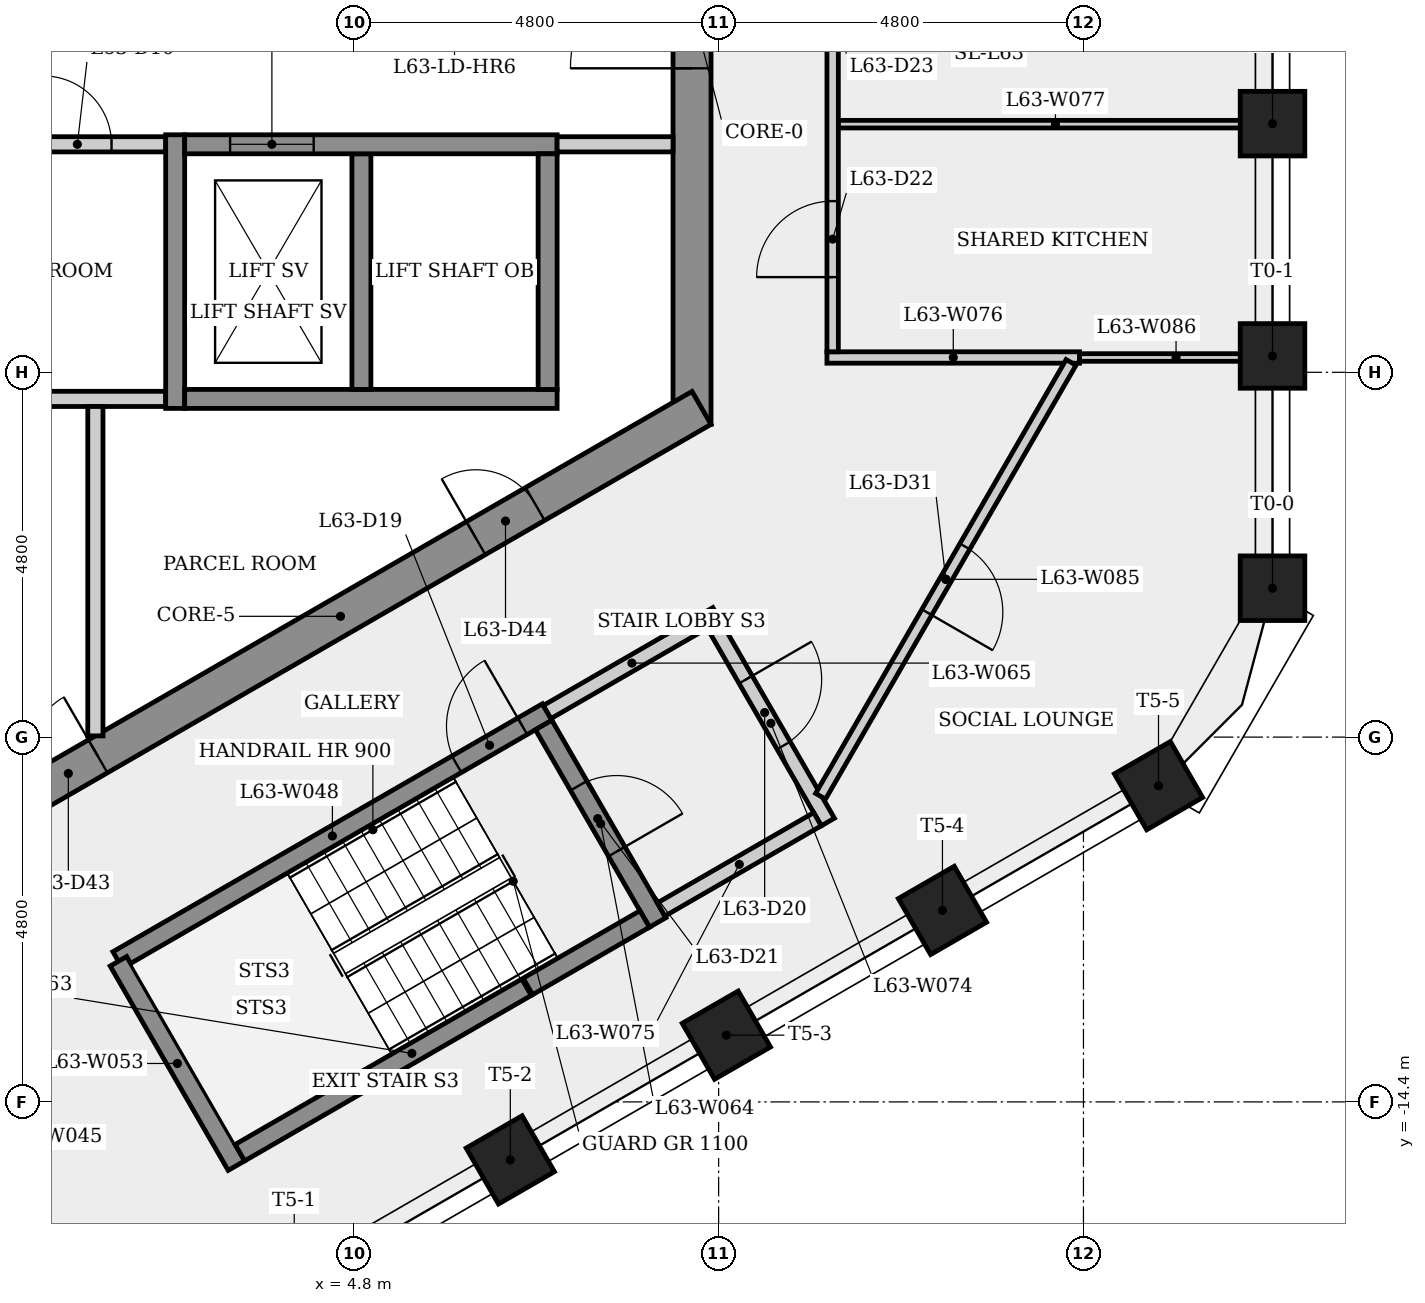
"""IFC4 building model, lengths in metres.
Left out: names, types, materials, properties, quantities, classifications, styles, units other than length and angle.
Written with IfcOpenShell. Run it as: python <this file> out.ifc"""

import sys

from ifc_helpers import new_model, si_unit, direction, frame, frame_2d, origin, origin_2d, place, context, subcontext, project, spatial, rectangle, extrude, element, fill, save


model = new_model("IFC4")
c1 = context("Model", 3, precision=1e-05, world=origin(), true_north=direction((0.0, 1.0)))
c2 = subcontext(c1, "Body", "Model", "MODEL_VIEW")
j1 = project(units=[si_unit("LENGTHUNIT", "METRE"), si_unit("PLANEANGLEUNIT", "RADIAN")], contexts=[c1])
p1 = place(None, origin())
s1 = spatial("IfcSite", under=j1, at=p1, CompositionType="ELEMENT")
p2 = place(p1, origin())
s2 = spatial("IfcBuilding", under=s1, at=p2, CompositionType="ELEMENT")
p3 = place(p2, frame((0.0, 0.0, 235.9)))
s3 = spatial("IfcBuildingStorey", under=s2, at=p3, CompositionType="ELEMENT", Elevation=235.9)
p4 = place(p3, frame((9.25, -5.485, 0.0), z_axis=(0.0, 0.0, 1.0), x_axis=(0.0, 1.0, 0.0)))
e1 = element("IfcWall", 1, at=p4, inside=s3, PredefinedType="SHEAR", context=c2, shape_type="SweptSolid", body=[
    extrude(rectangle(XDim=10.97, YDim=0.5, at=frame_2d((5.485, 0.0))), origin(), (0.0, 0.0, 1.0), 3.4),
])
p5 = place(p4, frame((4.685, 0.0, 0.0)))
e2 = element("IfcOpeningElement", 2, at=p5, cuts=e1, PredefinedType="OPENING", context=c2, shape_type="SweptSolid", body=[
    extrude(rectangle(XDim=1.6, YDim=2.1, at=frame_2d((0.8, 1.05))), frame((0.0, 0.26, 0.0), z_axis=(0.0, -1.0, 0.0), x_axis=(1.0, 0.0, 0.0)), (0.0, 0.0, 1.0), 0.52),
])
p6 = place(p3, frame((-0.125, -10.753, 0.0), z_axis=(0.0, 0.0, 1.0), x_axis=(0.866023993627, 0.500002442456, 0.0)))
e3 = element("IfcWall", 3, at=p6, inside=s3, PredefinedType="SHEAR", context=c2, shape_type="SweptSolid", body=[
    extrude(rectangle(XDim=10.97, YDim=0.5, at=frame_2d((5.485, 0.0))), origin(), (0.0, 0.0, 1.0), 3.4),
])
p7 = place(p6, frame((0.9, 0.0, 0.0)))
e4 = element("IfcOpeningElement", 4, at=p7, cuts=e3, PredefinedType="OPENING", context=c2, shape_type="SweptSolid", body=[
    extrude(rectangle(XDim=0.9, YDim=2.1, at=frame_2d((0.45, 1.05))), frame((0.0, 0.26, 0.0), z_axis=(0.0, -1.0, 0.0), x_axis=(1.0, 0.0, 0.0)), (0.0, 0.0, 1.0), 0.52),
])
p8 = place(p6, frame((7.542, 0.0, 0.0)))
e5 = element("IfcOpeningElement", 5, at=p8, cuts=e3, PredefinedType="OPENING", context=c2, shape_type="SweptSolid", body=[
    extrude(rectangle(XDim=0.9, YDim=2.1, at=frame_2d((0.45, 1.05))), frame((0.0, 0.26, 0.0), z_axis=(0.0, -1.0, 0.0), x_axis=(1.0, 0.0, 0.0)), (0.0, 0.0, 1.0), 0.52),
])
for number, where, z_axis, x_axis in (
    (6, (16.887, -7.641, 0.0), (0.0, 0.0, 1.0), (1.0, 0.0, 0.0)),
    (7, (16.887, -4.585, 0.0), (0.0, 0.0, 1.0), (1.0, 0.0, 0.0)),
    (8, (16.887, -1.528, 0.0), (0.0, 0.0, 1.0), (1.0, 0.0, 0.0)),
    (9, (6.859, -15.163, 0.0), (0.0, 0.0, 1.0), (0.5, -0.866, 0.0)),
    (10, (9.702, -13.522, 0.0), (0.0, 0.0, 1.0), (0.5, -0.866, 0.0)),
    (11, (12.545, -11.88, 0.0), (0.0, 0.0, 1.0), (0.5, -0.866, 0.0)),
    (12, (15.387, -10.239, 0.0), (0.0, 0.0, 1.0), (0.5, -0.866, 0.0)),
):
    element("IfcColumn", number, at=place(p3, frame(where, z_axis=z_axis, x_axis=x_axis)), inside=s3, PredefinedType="COLUMN", context=c2, shape_type="SweptSolid", body=[
        extrude(rectangle(XDim=0.85, YDim=0.85, at=origin_2d()), origin(), (0.0, 0.0, 1.0), 3.4),
    ])
p9 = place(p3, frame((-9.0, -5.15, 0.0), z_axis=(0.0, 0.0, 1.0), x_axis=(1.0, 0.0, 0.0)))
e13 = element("IfcWall", 13, at=p9, inside=s3, PredefinedType="PARTITIONING", context=c2, shape_type="SweptSolid", body=[
    extrude(rectangle(XDim=11.325, YDim=0.2, at=frame_2d((5.663, 0.0))), origin(), (0.0, 0.0, 1.0), 3.05),
])
p10 = place(p3, frame((-9.0, -1.8, 0.0), z_axis=(0.0, 0.0, 1.0), x_axis=(1.0, 0.0, 0.0)))
e14 = element("IfcWall", 14, at=p10, inside=s3, PredefinedType="PARTITIONING", context=c2, shape_type="SweptSolid", body=[
    extrude(rectangle(XDim=11.325, YDim=0.2, at=frame_2d((5.663, 0.0))), origin(), (0.0, 0.0, 1.0), 3.05),
])
p11 = place(p10, frame((2.185, 0.0, 0.0)))
e15 = element("IfcOpeningElement", 15, at=p11, cuts=e14, PredefinedType="OPENING", context=c2, shape_type="SweptSolid", body=[
    extrude(rectangle(XDim=0.9, YDim=2.1, at=frame_2d((0.45, 1.05))), frame((0.0, 0.11, 0.0), z_axis=(0.0, -1.0, 0.0), x_axis=(1.0, 0.0, 0.0)), (0.0, 0.0, 1.0), 0.22),
])
p12 = place(p10, frame((6.71, 0.0, 0.0)))
e16 = element("IfcOpeningElement", 16, at=p12, cuts=e14, PredefinedType="OPENING", context=c2, shape_type="SweptSolid", body=[
    extrude(rectangle(XDim=0.9, YDim=2.1, at=frame_2d((0.45, 1.05))), frame((0.0, 0.11, 0.0), z_axis=(0.0, -1.0, 0.0), x_axis=(1.0, 0.0, 0.0)), (0.0, 0.0, 1.0), 0.22),
])
p13 = place(p10, frame((9.713, 0.0, 0.0)))
e17 = element("IfcOpeningElement", 17, at=p13, cuts=e14, PredefinedType="OPENING", context=c2, shape_type="SweptSolid", body=[
    extrude(rectangle(XDim=0.9, YDim=2.1, at=frame_2d((0.45, 1.05))), frame((0.0, 0.11, 0.0), z_axis=(0.0, -1.0, 0.0), x_axis=(1.0, 0.0, 0.0)), (0.0, 0.0, 1.0), 0.22),
])
p14 = place(p3, frame((1.4, -5.25, 0.0), z_axis=(0.0, 0.0, 1.0), x_axis=(0.0, -1.0, 0.0)))
e18 = element("IfcWall", 18, at=p14, inside=s3, PredefinedType="PARTITIONING", context=c2, shape_type="SweptSolid", body=[
    extrude(rectangle(XDim=4.334, YDim=0.2, at=frame_2d((2.167, 0.0))), origin(), (0.0, 0.0, 1.0), 3.05),
])
p15 = place(p3, frame((1.693, -12.532, 0.0), z_axis=(0.0, 0.0, 1.0), x_axis=(0.866031063448, 0.499990197047, 0.0)))
e19 = element("IfcWall", 19, at=p15, inside=s3, PredefinedType="SHEAR", context=c2, shape_type="SweptSolid", body=[
    extrude(rectangle(XDim=6.525, YDim=0.25, at=frame_2d((3.263, 0.0))), origin(), (0.0, 0.0, 1.0), 3.05),
])
p16 = place(p15, frame((5.15, 0.0, 0.0)))
e20 = element("IfcOpeningElement", 20, at=p16, cuts=e19, PredefinedType="OPENING", context=c2, shape_type="SweptSolid", body=[
    extrude(rectangle(XDim=1.0, YDim=2.1, at=frame_2d((0.5, 1.05))), frame((0.0, 0.135, 0.0), z_axis=(0.0, -1.0, 0.0), x_axis=(1.0, 0.0, 0.0)), (0.0, 0.0, 1.0), 0.27),
])
p17 = place(p3, frame((2.45, -5.275, 0.0), z_axis=(0.0, 0.0, 1.0), x_axis=(0.0, 1.0, 0.0)))
e21 = element("IfcWall", 21, at=p17, inside=s3, PredefinedType="SHEAR", context=c2, shape_type="SweptSolid", body=[
    extrude(rectangle(XDim=3.6, YDim=0.25, at=frame_2d((1.8, 0.0))), origin(), (0.0, 0.0, 1.0), 3.05),
])
p18 = place(p3, frame((3.256, -15.239, 0.0), z_axis=(0.0, 0.0, 1.0), x_axis=(-0.500003782172, 0.866023220135, 0.0)))
e22 = element("IfcWall", 22, at=p18, inside=s3, PredefinedType="SHEAR", context=c2, shape_type="SweptSolid", body=[
    extrude(rectangle(XDim=3.105, YDim=0.25, at=frame_2d((1.552, 0.0))), origin(), (0.0, 0.0, 1.0), 3.05),
])
p19 = place(p3, frame((2.575, -5.15, 0.0), z_axis=(0.0, 0.0, 1.0), x_axis=(1.0, 0.0, 0.0)))
e23 = element("IfcWall", 23, at=p19, inside=s3, PredefinedType="SHEAR", context=c2, shape_type="SweptSolid", body=[
    extrude(rectangle(XDim=4.9, YDim=0.25, at=frame_2d((2.45, 0.0))), origin(), (0.0, 0.0, 1.0), 3.05),
])
p20 = place(p3, frame((4.9, -1.925, 0.0), z_axis=(0.0, 0.0, 1.0), x_axis=(0.0, -1.0, 0.0)))
e24 = element("IfcWall", 24, at=p20, inside=s3, PredefinedType="SHEAR", context=c2, shape_type="SweptSolid", body=[
    extrude(rectangle(XDim=3.1, YDim=0.25, at=frame_2d((1.55, 0.0))), origin(), (0.0, 0.0, 1.0), 3.4),
])
p21 = place(p3, frame((2.575, -1.8, 0.0), z_axis=(0.0, 0.0, 1.0), x_axis=(1.0, 0.0, 0.0)))
e25 = element("IfcWall", 25, at=p21, inside=s3, PredefinedType="SHEAR", context=c2, shape_type="SweptSolid", body=[
    extrude(rectangle(XDim=4.9, YDim=0.25, at=frame_2d((2.45, 0.0))), origin(), (0.0, 0.0, 1.0), 3.05),
])
p22 = place(p21, frame((0.597, 0.0, 0.0)))
e26 = element("IfcOpeningElement", 26, at=p22, cuts=e25, PredefinedType="OPENING", context=c2, shape_type="SweptSolid", body=[
    extrude(rectangle(XDim=1.1, YDim=2.1, at=frame_2d((0.55, 1.05))), frame((0.0, 0.135, 0.0), z_axis=(0.0, -1.0, 0.0), x_axis=(1.0, 0.0, 0.0)), (0.0, 0.0, 1.0), 0.27),
])
p23 = place(p3, frame((7.073, -12.891, 0.0), z_axis=(0.0, 0.0, 1.0), x_axis=(-0.866023145199, -0.500003911965, 0.0)))
e27 = element("IfcWall", 27, at=p23, inside=s3, PredefinedType="SHEAR", context=c2, shape_type="SweptSolid", body=[
    extrude(rectangle(XDim=4.355, YDim=0.25, at=frame_2d((2.177, 0.0))), origin(), (0.0, 0.0, 1.0), 3.05),
])
p24 = place(p3, frame((7.298, -9.441, 0.0), z_axis=(0.0, 0.0, 1.0), x_axis=(0.50002537861, -0.866010750942, 0.0)))
e28 = element("IfcWall", 28, at=p24, inside=s3, PredefinedType="SHEAR", context=c2, shape_type="SweptSolid", body=[
    extrude(rectangle(XDim=3.0, YDim=0.25, at=frame_2d((1.5, 0.0))), origin(), (0.0, 0.0, 1.0), 3.05),
])
p25 = place(p24, frame((0.923, 0.0, 0.0)))
e29 = element("IfcOpeningElement", 29, at=p25, cuts=e28, PredefinedType="OPENING", context=c2, shape_type="SweptSolid", body=[
    extrude(rectangle(XDim=1.0, YDim=2.1, at=frame_2d((0.5, 1.05))), frame((0.0, 0.135, 0.0), z_axis=(0.0, -1.0, 0.0), x_axis=(1.0, 0.0, 0.0)), (0.0, 0.0, 1.0), 0.27),
])
p26 = place(p3, frame((7.344, -9.27, 0.0), z_axis=(0.0, 0.0, 1.0), x_axis=(0.866005588531, 0.500034319456, 0.0)))
e30 = element("IfcWall", 30, at=p26, inside=s3, PredefinedType="PARTITIONING", context=c2, shape_type="SweptSolid", body=[
    extrude(rectangle(XDim=2.575, YDim=0.2, at=frame_2d((1.288, 0.0))), origin(), (0.0, 0.0, 1.0), 3.05),
])
p27 = place(p3, frame((7.35, -1.925, 0.0), z_axis=(0.0, 0.0, 1.0), x_axis=(0.0, -1.0, 0.0)))
e31 = element("IfcWall", 31, at=p27, inside=s3, PredefinedType="SHEAR", context=c2, shape_type="SweptSolid", body=[
    extrude(rectangle(XDim=3.1, YDim=0.25, at=frame_2d((1.55, 0.0))), origin(), (0.0, 0.0, 1.0), 3.4),
])
p28 = place(p3, frame((8.627, -11.993, 0.0), z_axis=(0.0, 0.0, 1.0), x_axis=(-0.866059624469, -0.499940723351, 0.0)))
e32 = element("IfcWall", 32, at=p28, inside=s3, PredefinedType="SHEAR", context=c2, shape_type="SweptSolid", body=[
    extrude(rectangle(XDim=1.775, YDim=0.25, at=frame_2d((0.888, 0.0))), origin(), (0.0, 0.0, 1.0), 3.05),
])
p29 = place(p3, frame((9.0, -1.8, 0.0), z_axis=(0.0, 0.0, 1.0), x_axis=(-1.0, 0.0, 0.0)))
e33 = element("IfcWall", 33, at=p29, inside=s3, PredefinedType="PARTITIONING", context=c2, shape_type="SweptSolid", body=[
    extrude(rectangle(XDim=1.525, YDim=0.2, at=frame_2d((0.763, 0.0))), origin(), (0.0, 0.0, 1.0), 3.05),
])
p30 = place(p3, frame((9.537, -8.119, 0.0), z_axis=(0.0, 0.0, 1.0), x_axis=(0.499990139034, -0.866031096941, 0.0)))
e34 = element("IfcWall", 34, at=p30, inside=s3, PredefinedType="PARTITIONING", context=c2, shape_type="SweptSolid", body=[
    extrude(rectangle(XDim=3.0, YDim=0.2, at=frame_2d((1.5, 0.0))), origin(), (0.0, 0.0, 1.0), 3.05),
])
p31 = place(p30, frame((0.837, 0.0, 0.0)))
e35 = element("IfcOpeningElement", 35, at=p31, cuts=e34, PredefinedType="OPENING", context=c2, shape_type="SweptSolid", body=[
    extrude(rectangle(XDim=1.0, YDim=2.1, at=frame_2d((0.5, 1.05))), frame((0.0, 0.11, 0.0), z_axis=(0.0, -1.0, 0.0), x_axis=(1.0, 0.0, 0.0)), (0.0, 0.0, 1.0), 0.22),
])
p32 = place(p3, frame((10.901, -10.681, 0.0), z_axis=(0.0, 0.0, 1.0), x_axis=(-0.866007538022, -0.500030943131, 0.0)))
e36 = element("IfcWall", 36, at=p32, inside=s3, PredefinedType="PARTITIONING", context=c2, shape_type="SweptSolid", body=[
    extrude(rectangle(XDim=2.375, YDim=0.2, at=frame_2d((1.188, 0.0))), origin(), (0.0, 0.0, 1.0), 3.05),
])
p33 = place(p3, frame((11.025, -4.605, 0.0), z_axis=(0.0, 0.0, 1.0), x_axis=(1.0, 0.0, 0.0)))
e37 = element("IfcWall", 37, at=p33, inside=s3, PredefinedType="PARTITIONING", context=c2, shape_type="SweptSolid", body=[
    extrude(rectangle(XDim=3.324, YDim=0.15, at=frame_2d((1.662, 0.0))), origin(), (0.0, 0.0, 1.0), 3.05),
])
p34 = place(p3, frame((11.175, -1.535, 0.0), z_axis=(0.0, 0.0, 1.0), x_axis=(1.0, 0.0, 0.0)))
e38 = element("IfcWall", 38, at=p34, inside=s3, PredefinedType="PARTITIONING", context=c2, shape_type="SweptSolid", body=[
    extrude(rectangle(XDim=5.712, YDim=0.1, at=frame_2d((2.856, 0.0))), origin(), (0.0, 0.0, 1.0), 3.05),
])
p35 = place(p3, frame((11.1, -4.53, 0.0), z_axis=(0.0, 0.0, 1.0), x_axis=(0.0, 1.0, 0.0)))
e39 = element("IfcWall", 39, at=p35, inside=s3, PredefinedType="PARTITIONING", context=c2, shape_type="SweptSolid", body=[
    extrude(rectangle(XDim=9.21, YDim=0.15, at=frame_2d((4.605, 0.0))), origin(), (0.0, 0.0, 1.0), 3.05),
])
p36 = place(p35, frame((0.983, 0.0, 0.0)))
e40 = element("IfcOpeningElement", 40, at=p36, cuts=e39, PredefinedType="OPENING", context=c2, shape_type="SweptSolid", body=[
    extrude(rectangle(XDim=1.0, YDim=2.1, at=frame_2d((0.5, 1.05))), frame((0.0, 0.085, 0.0), z_axis=(0.0, -1.0, 0.0), x_axis=(1.0, 0.0, 0.0)), (0.0, 0.0, 1.0), 0.17),
])
p37 = place(p35, frame((4.03, 0.0, 0.0)))
e41 = element("IfcOpeningElement", 41, at=p37, cuts=e39, PredefinedType="OPENING", context=c2, shape_type="SweptSolid", body=[
    extrude(rectangle(XDim=1.0, YDim=2.1, at=frame_2d((0.5, 1.05))), frame((0.0, 0.085, 0.0), z_axis=(0.0, -1.0, 0.0), x_axis=(1.0, 0.0, 0.0)), (0.0, 0.0, 1.0), 0.17),
])
p38 = place(p35, frame((7.1, 0.0, 0.0)))
e42 = element("IfcOpeningElement", 42, at=p38, cuts=e39, PredefinedType="OPENING", context=c2, shape_type="SweptSolid", body=[
    extrude(rectangle(XDim=1.0, YDim=2.1, at=frame_2d((0.5, 1.05))), frame((0.0, 0.085, 0.0), z_axis=(0.0, -1.0, 0.0), x_axis=(1.0, 0.0, 0.0)), (0.0, 0.0, 1.0), 0.17),
])
p39 = place(p3, frame((14.237, -4.67, 0.0), z_axis=(0.0, 0.0, 1.0), x_axis=(-0.500003557676, -0.866023349749, 0.0)))
e43 = element("IfcWall", 43, at=p39, inside=s3, PredefinedType="PARTITIONING", context=c2, shape_type="SweptSolid", body=[
    extrude(rectangle(XDim=6.591, YDim=0.15, at=frame_2d((3.295, 0.0))), origin(), (0.0, 0.0, 1.0), 3.05),
])
p40 = place(p39, frame((2.795, 0.0, 0.0)))
e44 = element("IfcOpeningElement", 44, at=p40, cuts=e43, PredefinedType="OPENING", context=c2, shape_type="SweptSolid", body=[
    extrude(rectangle(XDim=1.0, YDim=2.1, at=frame_2d((0.5, 1.05))), frame((0.0, 0.085, 0.0), z_axis=(0.0, -1.0, 0.0), x_axis=(1.0, 0.0, 0.0)), (0.0, 0.0, 1.0), 0.17),
])
p41 = place(p3, frame((16.887, -4.605, 0.0), z_axis=(0.0, 0.0, 1.0), x_axis=(-1.0, 0.0, 0.0)))
e45 = element("IfcWall", 45, at=p41, inside=s3, PredefinedType="PARTITIONING", context=c2, shape_type="SweptSolid", body=[
    extrude(rectangle(XDim=2.538, YDim=0.1, at=frame_2d((1.269, 0.0))), origin(), (0.0, 0.0, 1.0), 3.05),
])
p42 = place(p22, origin())
e46 = element("IfcDoor", 46, at=p42, inside=s3, OperationType="SLIDING_TO_LEFT", PredefinedType="DOOR", context=c2, shape_type="SweptSolid", body=[
    extrude(rectangle(XDim=1.1, YDim=2.1, at=frame_2d((0.55, 1.05))), frame((0.0, 0.025, 0.0), z_axis=(0.0, -1.0, 0.0), x_axis=(1.0, 0.0, 0.0)), (0.0, 0.0, 1.0), 0.05),
])
fill(e26, e46)
p43 = place(p13, origin())
e47 = element("IfcDoor", 47, at=p43, inside=s3, OperationType="SINGLE_SWING_LEFT", PredefinedType="DOOR", context=c2, shape_type="SweptSolid", body=[
    extrude(rectangle(XDim=0.9, YDim=2.1, at=frame_2d((0.45, 1.05))), frame((0.0, 0.025, 0.0), z_axis=(0.0, -1.0, 0.0), x_axis=(1.0, 0.0, 0.0)), (0.0, 0.0, 1.0), 0.05),
])
fill(e17, e47)
p44 = place(p16, origin())
e48 = element("IfcDoor", 48, at=p44, inside=s3, OperationType="SINGLE_SWING_RIGHT", PredefinedType="DOOR", context=c2, shape_type="SweptSolid", body=[
    extrude(rectangle(XDim=1.0, YDim=2.1, at=frame_2d((0.5, 1.05))), frame((0.0, 0.025, 0.0), z_axis=(0.0, -1.0, 0.0), x_axis=(1.0, 0.0, 0.0)), (0.0, 0.0, 1.0), 0.05),
])
fill(e20, e48)
p45 = place(p31, origin())
e49 = element("IfcDoor", 49, at=p45, inside=s3, OperationType="SINGLE_SWING_LEFT", PredefinedType="DOOR", context=c2, shape_type="SweptSolid", body=[
    extrude(rectangle(XDim=1.0, YDim=2.1, at=frame_2d((0.5, 1.05))), frame((0.0, 0.025, 0.0), z_axis=(0.0, -1.0, 0.0), x_axis=(1.0, 0.0, 0.0)), (0.0, 0.0, 1.0), 0.05),
])
fill(e35, e49)
p46 = place(p25, origin())
e50 = element("IfcDoor", 50, at=p46, inside=s3, OperationType="SINGLE_SWING_RIGHT", PredefinedType="DOOR", context=c2, shape_type="SweptSolid", body=[
    extrude(rectangle(XDim=1.0, YDim=2.1, at=frame_2d((0.5, 1.05))), frame((0.0, 0.025, 0.0), z_axis=(0.0, -1.0, 0.0), x_axis=(1.0, 0.0, 0.0)), (0.0, 0.0, 1.0), 0.05),
])
fill(e29, e50)
p47 = place(p36, origin())
e51 = element("IfcDoor", 51, at=p47, inside=s3, OperationType="SINGLE_SWING_LEFT", PredefinedType="DOOR", context=c2, shape_type="SweptSolid", body=[
    extrude(rectangle(XDim=1.0, YDim=2.1, at=frame_2d((0.5, 1.05))), frame((0.0, 0.025, 0.0), z_axis=(0.0, -1.0, 0.0), x_axis=(1.0, 0.0, 0.0)), (0.0, 0.0, 1.0), 0.05),
])
fill(e40, e51)
p48 = place(p40, origin())
e52 = element("IfcDoor", 52, at=p48, inside=s3, OperationType="SINGLE_SWING_RIGHT", PredefinedType="DOOR", context=c2, shape_type="SweptSolid", body=[
    extrude(rectangle(XDim=1.0, YDim=2.1, at=frame_2d((0.5, 1.05))), frame((0.0, 0.025, 0.0), z_axis=(0.0, -1.0, 0.0), x_axis=(1.0, 0.0, 0.0)), (0.0, 0.0, 1.0), 0.05),
])
fill(e44, e52)
p49 = place(p7, origin())
e53 = element("IfcDoor", 53, at=p49, inside=s3, OperationType="SINGLE_SWING_RIGHT", PredefinedType="DOOR", context=c2, shape_type="SweptSolid", body=[
    extrude(rectangle(XDim=0.9, YDim=2.1, at=frame_2d((0.45, 1.05))), frame((0.0, 0.025, 0.0), z_axis=(0.0, -1.0, 0.0), x_axis=(1.0, 0.0, 0.0)), (0.0, 0.0, 1.0), 0.05),
])
fill(e4, e53)
p50 = place(p8, origin())
e54 = element("IfcDoor", 54, at=p50, inside=s3, OperationType="SINGLE_SWING_LEFT", PredefinedType="DOOR", context=c2, shape_type="SweptSolid", body=[
    extrude(rectangle(XDim=0.9, YDim=2.1, at=frame_2d((0.45, 1.05))), frame((0.0, 0.025, 0.0), z_axis=(0.0, -1.0, 0.0), x_axis=(1.0, 0.0, 0.0)), (0.0, 0.0, 1.0), 0.05),
])
fill(e5, e54)
p51 = place(p5, origin())
e55 = element("IfcDoor", 55, at=p51, inside=s3, OperationType="SINGLE_SWING_LEFT", PredefinedType="DOOR", context=c2, shape_type="SweptSolid", body=[
    extrude(rectangle(XDim=1.6, YDim=2.1, at=frame_2d((0.8, 1.05))), frame((0.0, 0.025, 0.0), z_axis=(0.0, -1.0, 0.0), x_axis=(1.0, 0.0, 0.0)), (0.0, 0.0, 1.0), 0.05),
])
fill(e2, e55)
save(model, sys.argv[1])
